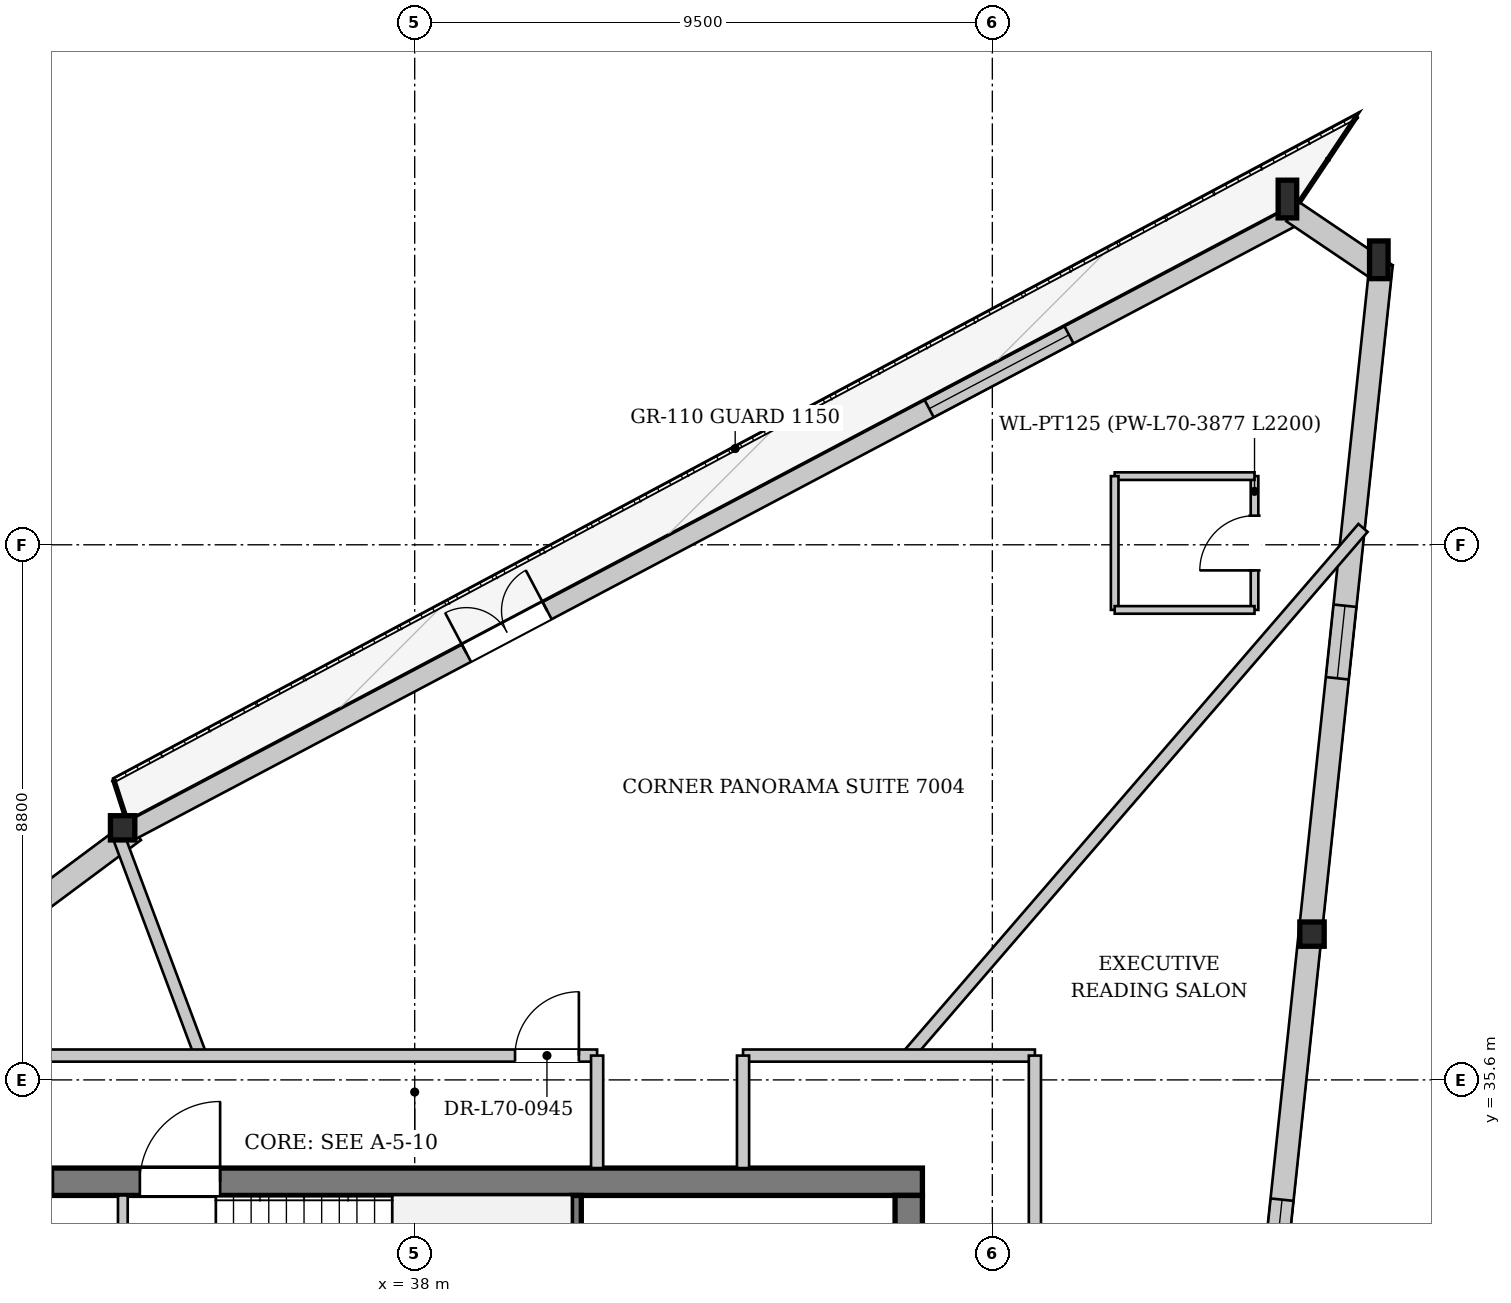
"""IFC4 building model, lengths in metres.
Left out: names, types, materials, properties, quantities, classifications, styles, units other than length and angle.
Written with IfcOpenShell. Run it as: python <this file> out.ifc"""

import sys

from ifc_helpers import new_model, si_unit, direction, frame, frame_2d, origin, origin_2d, place, context, subcontext, project, spatial, rectangle, i_section, extrude, source, transform, mapped, element, fill, save


model = new_model("IFC4")
c1 = context("Model", 3, precision=1e-05, world=origin(), true_north=direction((0.0, 1.0)))
c2 = subcontext(c1, "Body", "Model", "MODEL_VIEW")
j1 = project(units=[si_unit("LENGTHUNIT", "METRE"), si_unit("PLANEANGLEUNIT", "RADIAN")], contexts=[c1])
p1 = place(None, origin())
s1 = spatial("IfcSite", under=j1, at=p1, CompositionType="ELEMENT")
p2 = place(p1, origin())
s2 = spatial("IfcBuilding", under=s1, at=p2, CompositionType="ELEMENT")
p3 = place(p2, frame((0.0, 0.0, 263.3)))
s3 = spatial("IfcBuildingStorey", under=s2, at=p3, CompositionType="ELEMENT", Elevation=263.3)
m1 = source(origin(), c2, "Body", "SweptSolid", [
    extrude(i_section(OverallWidth=0.305, OverallDepth=0.62, WebThickness=0.021, FlangeThickness=0.04, at=origin_2d()), origin(), (0.0, 0.0, 1.0), 3.47),
])
p4 = place(p3, frame((54.084, 48.997, 0.0), z_axis=(-0.131430913632, 0.052136138652, 0.989953401928), x_axis=(-0.368729509372, -0.929536738875, 0.0)))
e1 = element("IfcColumn", 1, at=p4, inside=s3, PredefinedType="COLUMN", context=c2, shape_type="MappedRepresentation", body=[
    mapped(m1, transform((0.0, 0.0, 0.0), x_axis=(1.0, 0.0, 0.0), y_axis=(0.0, 1.0, 0.0), z_axis=(0.0, 0.0, 1.0), scale=1.0)),
])
m2 = source(origin(), c2, "Body", "SweptSolid", [
    extrude(i_section(OverallWidth=0.305, OverallDepth=0.62, WebThickness=0.021, FlangeThickness=0.04, at=origin_2d()), origin(), (0.0, 0.0, 1.0), 3.459),
])
p5 = place(p3, frame((52.548, 50.034, 0.0), z_axis=(-0.112729707062, 0.029788313325, 0.99317907224), x_axis=(-0.255476541917, -0.966815254601, 0.0)))
e2 = element("IfcColumn", 2, at=p5, inside=s3, PredefinedType="COLUMN", context=c2, shape_type="MappedRepresentation", body=[
    mapped(m2, transform((0.0, 0.0, 0.0), x_axis=(1.0, 0.0, 0.0), y_axis=(0.0, 1.0, 0.0), z_axis=(0.0, 0.0, 1.0), scale=1.0)),
])
m3 = source(origin(), c2, "Body", "SweptSolid", [
    extrude(i_section(OverallWidth=0.401, OverallDepth=0.399, WebThickness=0.022, FlangeThickness=0.034, at=origin_2d()), origin(), (0.0, 0.0, 1.0), 3.445),
])
p6 = place(p3, frame((33.271, 39.849, 0.0), z_axis=(-0.043376779188, -0.06024552665, 0.997240658791), x_axis=(0.811534341451, -0.584304725845, 0.0)))
e3 = element("IfcColumn", 3, at=p6, inside=s3, PredefinedType="COLUMN", context=c2, shape_type="MappedRepresentation", body=[
    mapped(m3, transform((0.0, 0.0, 0.0), x_axis=(1.0, 0.0, 0.0), y_axis=(0.0, 1.0, 0.0), z_axis=(0.0, 0.0, 1.0), scale=1.0)),
])
m4 = source(origin(), c2, "Body", "SweptSolid", [
    extrude(i_section(OverallWidth=0.401, OverallDepth=0.399, WebThickness=0.022, FlangeThickness=0.034, at=origin_2d()), origin(), (0.0, 0.0, 1.0), 3.454),
])
p7 = place(p3, frame((52.908, 37.897, 0.0), z_axis=(-0.087222439843, 0.057889123364, 0.994505452667), x_axis=(-0.552985061708, -0.833191167457, 0.0)))
e4 = element("IfcColumn", 4, at=p7, inside=s3, PredefinedType="COLUMN", context=c2, shape_type="MappedRepresentation", body=[
    mapped(m4, transform((0.0, 0.0, 0.0), x_axis=(1.0, 0.0, 0.0), y_axis=(0.0, 1.0, 0.0), z_axis=(0.0, 0.0, 1.0), scale=1.0)),
])
p8 = place(p3, frame((15.894, 26.68, 0.0), z_axis=(0.0, 0.0, 1.0), x_axis=(0.802229105353, 0.59701630005, 0.0)))
e5 = element("IfcWall", 5, at=p8, inside=s3, PredefinedType="SOLIDWALL", context=c2, shape_type="SweptSolid", body=[
    extrude(rectangle(XDim=21.802, YDim=0.38, at=frame_2d((10.901, 0.0))), origin(), (0.0, 0.0, 1.0), 2.872),
])
p9 = place(p8, frame((7.105, 0.0, 0.65)))
e6 = element("IfcOpeningElement", 6, at=p9, cuts=e5, PredefinedType="OPENING", context=c2, shape_type="SweptSolid", body=[
    extrude(rectangle(XDim=1.2, YDim=1.5, at=frame_2d((0.6, 0.75))), frame((0.0, 0.2, 0.0), z_axis=(0.0, -1.0, 0.0), x_axis=(1.0, 0.0, 0.0)), (0.0, 0.0, 1.0), 0.4),
])
p10 = place(p8, frame((16.698, 0.0, 0.65)))
e7 = element("IfcOpeningElement", 7, at=p10, cuts=e5, PredefinedType="OPENING", context=c2, shape_type="SweptSolid", body=[
    extrude(rectangle(XDim=1.2, YDim=1.5, at=frame_2d((0.6, 0.75))), frame((0.0, 0.2, 0.0), z_axis=(0.0, -1.0, 0.0), x_axis=(1.0, 0.0, 0.0)), (0.0, 0.0, 1.0), 0.4),
])
p11 = place(p3, frame((33.346, 39.708, 0.0), z_axis=(0.0, 0.0, 1.0), x_axis=(0.884171130731, 0.467163153066, 0.0)))
e8 = element("IfcWall", 8, at=p11, inside=s3, PredefinedType="SOLIDWALL", context=c2, shape_type="SweptSolid", body=[
    extrude(rectangle(XDim=21.802, YDim=0.32, at=frame_2d((10.901, 0.0))), origin(), (0.0, 0.0, 1.0), 2.872),
])
p12 = place(p11, frame((6.227, 0.0, 0.0)))
e9 = element("IfcOpeningElement", 9, at=p12, cuts=e8, PredefinedType="OPENING", context=c2, shape_type="SweptSolid", body=[
    extrude(rectangle(XDim=1.5, YDim=2.3, at=frame_2d((0.75, 1.15))), frame((0.0, 0.17, 0.0), z_axis=(0.0, -1.0, 0.0), x_axis=(1.0, 0.0, 0.0)), (0.0, 0.0, 1.0), 0.34),
])
p13 = place(p11, frame((14.834, 0.0, 0.402)))
e10 = element("IfcOpeningElement", 10, at=p13, cuts=e8, PredefinedType="OPENING", context=c2, shape_type="SweptSolid", body=[
    extrude(rectangle(XDim=2.6, YDim=2.35, at=frame_2d((1.3, 1.175))), frame((0.0, 0.17, 0.0), z_axis=(0.0, -1.0, 0.0), x_axis=(1.0, 0.0, 0.0)), (0.0, 0.0, 1.0), 0.34),
])
p14 = place(p3, frame((52.442, 49.877, 0.0), z_axis=(0.0, 0.0, 1.0), x_axis=(0.828508052688, -0.559977148312, 0.0)))
e11 = element("IfcWall", 11, at=p14, inside=s3, PredefinedType="SOLIDWALL", context=c2, shape_type="SweptSolid", body=[
    extrude(rectangle(XDim=1.854, YDim=0.38, at=frame_2d((0.927, 0.0))), origin(), (0.0, 0.0, 1.0), 2.872),
])
p15 = place(p3, frame((53.896, 49.017, 0.0), z_axis=(0.0, 0.0, 1.0), x_axis=(-0.105399254058, -0.994429986095, 0.0)))
e12 = element("IfcWall", 12, at=p15, inside=s3, PredefinedType="SOLIDWALL", context=c2, shape_type="SweptSolid", body=[
    extrude(rectangle(XDim=22.323, YDim=0.38, at=frame_2d((11.161, 0.0))), origin(), (0.0, 0.0, 1.0), 2.872),
])
p16 = place(p15, frame((5.65, 0.0, 0.65)))
e13 = element("IfcOpeningElement", 13, at=p16, cuts=e12, PredefinedType="OPENING", context=c2, shape_type="SweptSolid", body=[
    extrude(rectangle(XDim=1.2, YDim=1.5, at=frame_2d((0.6, 0.75))), frame((0.0, 0.2, 0.0), z_axis=(0.0, -1.0, 0.0), x_axis=(1.0, 0.0, 0.0)), (0.0, 0.0, 1.0), 0.4),
])
p17 = place(p15, frame((15.472, 0.0, 0.65)))
e14 = element("IfcOpeningElement", 14, at=p17, cuts=e12, PredefinedType="OPENING", context=c2, shape_type="SweptSolid", body=[
    extrude(rectangle(XDim=1.2, YDim=1.5, at=frame_2d((0.6, 0.75))), frame((0.0, 0.2, 0.0), z_axis=(0.0, -1.0, 0.0), x_axis=(1.0, 0.0, 0.0)), (0.0, 0.0, 1.0), 0.4),
])
p18 = place(p3, frame((29.65, 33.925, 0.0), z_axis=(0.0, 0.0, 1.0), x_axis=(1.0, 0.0, 0.0)))
e15 = element("IfcWall", 15, at=p18, inside=s3, PredefinedType="SHEAR", context=c2, shape_type="SweptSolid", body=[
    extrude(rectangle(XDim=16.7, YDim=0.45, at=frame_2d((8.35, 0.0))), origin(), (0.0, 0.0, 1.0), 3.38),
])
p19 = place(p18, frame((1.45, 0.0, 0.0)))
e16 = element("IfcOpeningElement", 16, at=p19, cuts=e15, PredefinedType="OPENING", context=c2, shape_type="SweptSolid", body=[
    extrude(rectangle(XDim=0.95, YDim=2.1, at=frame_2d((0.475, 1.05))), frame((0.0, 0.235, 0.0), z_axis=(0.0, -1.0, 0.0), x_axis=(1.0, 0.0, 0.0)), (0.0, 0.0, 1.0), 0.47),
])
p20 = place(p18, frame((3.83, 0.0, 0.0)))
e17 = element("IfcOpeningElement", 17, at=p20, cuts=e15, PredefinedType="OPENING", context=c2, shape_type="SweptSolid", body=[
    extrude(rectangle(XDim=1.32, YDim=2.2, at=frame_2d((0.66, 1.1))), frame((0.0, 0.235, 0.0), z_axis=(0.0, -1.0, 0.0), x_axis=(1.0, 0.0, 0.0)), (0.0, 0.0, 1.0), 0.47),
])
p21 = place(p3, frame((46.125, 33.7, 0.0), z_axis=(0.0, 0.0, 1.0), x_axis=(0.0, -1.0, 0.0)))
e18 = element("IfcWall", 18, at=p21, inside=s3, PredefinedType="SHEAR", context=c2, shape_type="SweptSolid", body=[
    extrude(rectangle(XDim=14.2, YDim=0.45, at=frame_2d((7.1, 0.0))), origin(), (0.0, 0.0, 1.0), 3.38),
])
p22 = place(p21, frame((5.18, 0.0, 0.0)))
e19 = element("IfcOpeningElement", 19, at=p22, cuts=e18, PredefinedType="OPENING", context=c2, shape_type="SweptSolid", body=[
    extrude(rectangle(XDim=1.6, YDim=2.2, at=frame_2d((0.8, 1.1))), frame((0.0, 0.235, 0.0), z_axis=(0.0, -1.0, 0.0), x_axis=(1.0, 0.0, 0.0)), (0.0, 0.0, 1.0), 0.47),
])
p23 = place(p21, frame((2.05, 0.0, 0.0)))
e20 = element("IfcOpeningElement", 20, at=p23, cuts=e18, PredefinedType="OPENING", context=c2, shape_type="SweptSolid", body=[
    extrude(rectangle(XDim=0.95, YDim=2.1, at=frame_2d((0.475, 1.05))), frame((0.0, 0.235, 0.0), z_axis=(0.0, -1.0, 0.0), x_axis=(1.0, 0.0, 0.0)), (0.0, 0.0, 1.0), 0.47),
])
p24 = place(p3, frame((40.66, 30.6, 0.0), z_axis=(0.0, 0.0, 1.0), x_axis=(0.0, 1.0, 0.0)))
e21 = element("IfcWall", 21, at=p24, inside=s3, PredefinedType="PARTITIONING", context=c2, shape_type="SweptSolid", body=[
    extrude(rectangle(XDim=3.1, YDim=0.16, at=frame_2d((1.55, 0.0))), origin(), (0.0, 0.0, 1.0), 3.38),
])
p25 = place(p3, frame((33.2, 28.44, 0.0), z_axis=(0.0, 0.0, 1.0), x_axis=(0.0, 1.0, 0.0)))
e22 = element("IfcWall", 22, at=p25, inside=s3, PredefinedType="PARTITIONING", context=c2, shape_type="SweptSolid", body=[
    extrude(rectangle(XDim=5.26, YDim=0.16, at=frame_2d((2.63, 0.0))), origin(), (0.0, 0.0, 1.0), 3.38),
])
p26 = place(p3, frame((46.11, 36.0, 0.0), z_axis=(0.0, 0.0, 1.0), x_axis=(0.653228227984, 0.757161067518, 0.0)))
e23 = element("IfcWall", 23, at=p26, inside=s3, PredefinedType="PARTITIONING", context=c2, shape_type="SweptSolid", body=[
    extrude(rectangle(XDim=11.461, YDim=0.2, at=frame_2d((5.73, 0.0))), origin(), (0.0, 0.0, 1.0), 3.38),
])
p27 = place(p3, frame((34.479, 36.0, 0.0), z_axis=(0.0, 0.0, 1.0), x_axis=(-0.350701737224, 0.936487208406, 0.0)))
e24 = element("IfcWall", 24, at=p27, inside=s3, PredefinedType="PARTITIONING", context=c2, shape_type="SweptSolid", body=[
    extrude(rectangle(XDim=3.934, YDim=0.2, at=frame_2d((1.967, 0.0))), origin(), (0.0, 0.0, 1.0), 2.915),
])
p28 = place(p3, frame((51.812, 43.329, 0.0), z_axis=(0.0, 0.0, 1.0), x_axis=(0.0, 1.0, 0.0)))
e25 = element("IfcWall", 25, at=p28, inside=s3, PredefinedType="PARTITIONING", context=c2, shape_type="SweptSolid", body=[
    extrude(rectangle(XDim=2.2, YDim=0.125, at=frame_2d((1.1, 0.0))), origin(), (0.0, 0.0, 1.0), 3.38),
])
p29 = place(p28, frame((0.65, 0.0, 0.0)))
e26 = element("IfcOpeningElement", 26, at=p29, cuts=e25, PredefinedType="OPENING", context=c2, shape_type="SweptSolid", body=[
    extrude(rectangle(XDim=0.9, YDim=2.1, at=frame_2d((0.45, 1.05))), frame((0.0, 0.073, 0.0), z_axis=(0.0, -1.0, 0.0), x_axis=(1.0, 0.0, 0.0)), (0.0, 0.0, 1.0), 0.145),
])
p30 = place(p3, frame((51.812, 45.529, 0.0), z_axis=(0.0, 0.0, 1.0), x_axis=(-1.0, 0.0, 0.0)))
e27 = element("IfcWall", 27, at=p30, inside=s3, PredefinedType="PARTITIONING", context=c2, shape_type="SweptSolid", body=[
    extrude(rectangle(XDim=2.3, YDim=0.125, at=frame_2d((1.15, 0.0))), origin(), (0.0, 0.0, 1.0), 3.38),
])
p31 = place(p3, frame((49.512, 45.529, 0.0), z_axis=(0.0, 0.0, 1.0), x_axis=(0.0, -1.0, 0.0)))
e28 = element("IfcWall", 28, at=p31, inside=s3, PredefinedType="PARTITIONING", context=c2, shape_type="SweptSolid", body=[
    extrude(rectangle(XDim=2.2, YDim=0.125, at=frame_2d((1.1, 0.0))), origin(), (0.0, 0.0, 1.0), 3.055),
])
p32 = place(p3, frame((49.512, 43.329, 0.0), z_axis=(0.0, 0.0, 1.0), x_axis=(1.0, 0.0, 0.0)))
e29 = element("IfcWall", 29, at=p32, inside=s3, PredefinedType="PARTITIONING", context=c2, shape_type="SweptSolid", body=[
    extrude(rectangle(XDim=2.3, YDim=0.125, at=frame_2d((1.15, 0.0))), origin(), (0.0, 0.0, 1.0), 3.38),
])
p33 = place(p3, frame((28.149, 36.0, 0.0), z_axis=(0.0, 0.0, 1.0), x_axis=(1.0, 0.0, 0.0)))
e30 = element("IfcWall", 30, at=p33, inside=s3, PredefinedType="PARTITIONING", context=c2, shape_type="SweptSolid", body=[
    extrude(rectangle(XDim=12.851, YDim=0.2, at=frame_2d((6.425, 0.0))), origin(), (0.0, 0.0, 1.0), 3.38),
])
p34 = place(p33, frame((11.501, 0.0, 0.0)))
e31 = element("IfcOpeningElement", 31, at=p34, cuts=e30, PredefinedType="OPENING", context=c2, shape_type="SweptSolid", body=[
    extrude(rectangle(XDim=1.05, YDim=2.2, at=frame_2d((0.525, 1.1))), frame((0.0, 0.11, 0.0), z_axis=(0.0, -1.0, 0.0), x_axis=(1.0, 0.0, 0.0)), (0.0, 0.0, 1.0), 0.22),
])
p35 = place(p3, frame((41.0, 34.15, 0.0), z_axis=(0.0, 0.0, 1.0), x_axis=(0.0, 1.0, 0.0)))
e32 = element("IfcWall", 32, at=p35, inside=s3, PredefinedType="PARTITIONING", context=c2, shape_type="SweptSolid", body=[
    extrude(rectangle(XDim=1.85, YDim=0.2, at=frame_2d((0.925, 0.0))), origin(), (0.0, 0.0, 1.0), 3.38),
])
p36 = place(p3, frame((43.4, 36.0, 0.0), z_axis=(0.0, 0.0, 1.0), x_axis=(1.0, 0.0, 0.0)))
e33 = element("IfcWall", 33, at=p36, inside=s3, PredefinedType="PARTITIONING", context=c2, shape_type="SweptSolid", body=[
    extrude(rectangle(XDim=4.8, YDim=0.2, at=frame_2d((2.4, 0.0))), origin(), (0.0, 0.0, 1.0), 3.38),
])
p37 = place(p3, frame((43.4, 34.15, 0.0), z_axis=(0.0, 0.0, 1.0), x_axis=(0.0, 1.0, 0.0)))
e34 = element("IfcWall", 34, at=p37, inside=s3, PredefinedType="PARTITIONING", context=c2, shape_type="SweptSolid", body=[
    extrude(rectangle(XDim=1.85, YDim=0.2, at=frame_2d((0.925, 0.0))), origin(), (0.0, 0.0, 1.0), 3.055),
])
p38 = place(p3, frame((48.2, 17.2, 0.0), z_axis=(0.0, 0.0, 1.0), x_axis=(0.0, 1.0, 0.0)))
e35 = element("IfcWall", 35, at=p38, inside=s3, PredefinedType="PARTITIONING", context=c2, shape_type="SweptSolid", body=[
    extrude(rectangle(XDim=18.8, YDim=0.2, at=frame_2d((9.4, 0.0))), origin(), (0.0, 0.0, 1.0), 3.005),
])
p39 = place(p38, frame((0.3, 0.0, 0.0)))
e36 = element("IfcOpeningElement", 36, at=p39, cuts=e35, PredefinedType="OPENING", context=c2, shape_type="SweptSolid", body=[
    extrude(rectangle(XDim=1.05, YDim=2.2, at=frame_2d((0.525, 1.1))), frame((0.0, 0.11, 0.0), z_axis=(0.0, -1.0, 0.0), x_axis=(1.0, 0.0, 0.0)), (0.0, 0.0, 1.0), 0.22),
])
p40 = place(p38, frame((13.705, 0.0, 0.0)))
e37 = element("IfcOpeningElement", 37, at=p40, cuts=e35, PredefinedType="OPENING", context=c2, shape_type="SweptSolid", body=[
    extrude(rectangle(XDim=1.05, YDim=2.2, at=frame_2d((0.525, 1.1))), frame((0.0, 0.11, 0.0), z_axis=(0.0, -1.0, 0.0), x_axis=(1.0, 0.0, 0.0)), (0.0, 0.0, 1.0), 0.22),
])
m5 = source(origin(), c2, "Body", "SweptSolid", [
    extrude(rectangle(XDim=1.5, YDim=2.3, at=frame_2d((0.75, 1.15))), frame((0.0, 0.025, 0.0), z_axis=(0.0, -1.0, 0.0), x_axis=(1.0, 0.0, 0.0)), (0.0, 0.0, 1.0), 0.05),
])
p41 = place(p12, origin())
e38 = element("IfcDoor", 38, at=p41, inside=s3, OperationType="DOUBLE_DOOR_SINGLE_SWING", PredefinedType="DOOR", context=c2, shape_type="MappedRepresentation", body=[
    mapped(m5, transform((0.0, 0.0, 0.0), x_axis=(1.0, 0.0, 0.0), y_axis=(0.0, 1.0, 0.0), z_axis=(0.0, 0.0, 1.0), scale=1.0)),
])
fill(e9, e38)
m6 = source(origin(), c2, "Body", "SweptSolid", [
    extrude(rectangle(XDim=2.6, YDim=2.35, at=frame_2d((1.3, 1.175))), frame((0.0, 0.03, 0.0), z_axis=(0.0, -1.0, 0.0), x_axis=(1.0, 0.0, 0.0)), (0.0, 0.0, 1.0), 0.06),
])
p42 = place(p13, origin())
e39 = element("IfcWindow", 39, at=p42, inside=s3, PartitioningType="SINGLE_PANEL", PredefinedType="WINDOW", context=c2, shape_type="MappedRepresentation", body=[
    mapped(m6, transform((0.0, 0.0, 0.0), x_axis=(1.0, 0.0, 0.0), y_axis=(0.0, 1.0, 0.0), z_axis=(0.0, 0.0, 1.0), scale=1.0)),
])
fill(e10, e39)
m7 = source(origin(), c2, "Body", "SweptSolid", [
    extrude(rectangle(XDim=1.2, YDim=1.5, at=frame_2d((0.6, 0.75))), frame((0.0, 0.03, 0.0), z_axis=(0.0, -1.0, 0.0), x_axis=(1.0, 0.0, 0.0)), (0.0, 0.0, 1.0), 0.06),
])
p43 = place(p16, origin())
e40 = element("IfcWindow", 40, at=p43, inside=s3, PartitioningType="SINGLE_PANEL", PredefinedType="WINDOW", context=c2, shape_type="MappedRepresentation", body=[
    mapped(m7, transform((0.0, 0.0, 0.0), x_axis=(1.0, 0.0, 0.0), y_axis=(0.0, 1.0, 0.0), z_axis=(0.0, 0.0, 1.0), scale=1.0)),
])
fill(e13, e40)
p44 = place(p17, origin())
e41 = element("IfcWindow", 41, at=p44, inside=s3, PartitioningType="SINGLE_PANEL", PredefinedType="WINDOW", context=c2, shape_type="MappedRepresentation", body=[
    mapped(m7, transform((0.0, 0.0, 0.0), x_axis=(1.0, 0.0, 0.0), y_axis=(0.0, 1.0, 0.0), z_axis=(0.0, 0.0, 1.0), scale=1.0)),
])
fill(e14, e41)
m8 = source(origin(), c2, "Body", "SweptSolid", [
    extrude(rectangle(XDim=0.95, YDim=2.1, at=frame_2d((0.475, 1.05))), frame((0.0, 0.025, 0.0), z_axis=(0.0, -1.0, 0.0), x_axis=(1.0, 0.0, 0.0)), (0.0, 0.0, 1.0), 0.05),
])
p45 = place(p19, origin())
e42 = element("IfcDoor", 42, at=p45, inside=s3, OperationType="SINGLE_SWING_LEFT", PredefinedType="DOOR", context=c2, shape_type="MappedRepresentation", body=[
    mapped(m8, transform((0.0, 0.0, 0.0), x_axis=(1.0, 0.0, 0.0), y_axis=(0.0, 1.0, 0.0), z_axis=(0.0, 0.0, 1.0), scale=1.0)),
])
fill(e16, e42)
m9 = source(origin(), c2, "Body", "SweptSolid", [
    extrude(rectangle(XDim=1.32, YDim=2.2, at=frame_2d((0.66, 1.1))), frame((0.0, 0.025, 0.0), z_axis=(0.0, -1.0, 0.0), x_axis=(1.0, 0.0, 0.0)), (0.0, 0.0, 1.0), 0.05),
])
p46 = place(p20, origin())
e43 = element("IfcDoor", 43, at=p46, inside=s3, OperationType="SINGLE_SWING_RIGHT", PredefinedType="DOOR", context=c2, shape_type="MappedRepresentation", body=[
    mapped(m9, transform((0.0, 0.0, 0.0), x_axis=(1.0, 0.0, 0.0), y_axis=(0.0, 1.0, 0.0), z_axis=(0.0, 0.0, 1.0), scale=1.0)),
])
fill(e17, e43)
m10 = source(origin(), c2, "Body", "SweptSolid", [
    extrude(rectangle(XDim=0.9, YDim=2.1, at=frame_2d((0.45, 1.05))), frame((0.0, 0.025, 0.0), z_axis=(0.0, -1.0, 0.0), x_axis=(1.0, 0.0, 0.0)), (0.0, 0.0, 1.0), 0.05),
])
p47 = place(p29, origin())
e44 = element("IfcDoor", 44, at=p47, inside=s3, OperationType="SINGLE_SWING_LEFT", PredefinedType="DOOR", context=c2, shape_type="MappedRepresentation", body=[
    mapped(m10, transform((0.0, 0.0, 0.0), x_axis=(1.0, 0.0, 0.0), y_axis=(0.0, 1.0, 0.0), z_axis=(0.0, 0.0, 1.0), scale=1.0)),
])
fill(e26, e44)
m11 = source(origin(), c2, "Body", "SweptSolid", [
    extrude(rectangle(XDim=1.05, YDim=2.2, at=frame_2d((0.525, 1.1))), frame((0.0, 0.025, 0.0), z_axis=(0.0, -1.0, 0.0), x_axis=(1.0, 0.0, 0.0)), (0.0, 0.0, 1.0), 0.05),
])
p48 = place(p34, origin())
e45 = element("IfcDoor", 45, at=p48, inside=s3, OperationType="SINGLE_SWING_RIGHT", PredefinedType="DOOR", context=c2, shape_type="MappedRepresentation", body=[
    mapped(m11, transform((0.0, 0.0, 0.0), x_axis=(1.0, 0.0, 0.0), y_axis=(0.0, 1.0, 0.0), z_axis=(0.0, 0.0, 1.0), scale=1.0)),
])
fill(e31, e45)
save(model, sys.argv[1])
